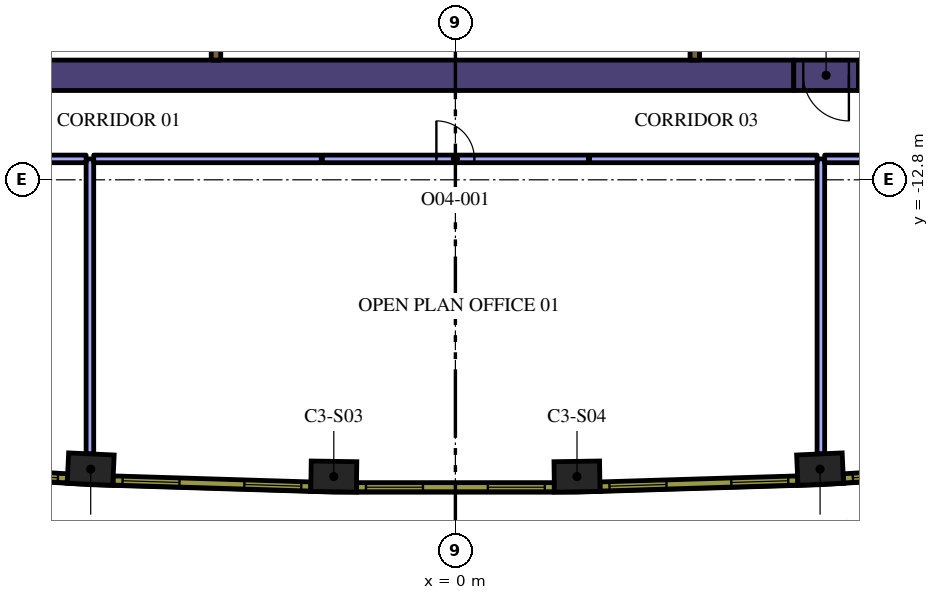
"""IFC4 building model, lengths in metres.
Left out: names, types, materials, properties, quantities, classifications, styles, units other than length and angle.
Written with IfcOpenShell. Run it as: python <this file> out.ifc"""

import sys

from ifc_helpers import new_model, si_unit, direction, frame, frame_2d, origin, origin_2d, place, context, subcontext, project, spatial, rectangle, extrude, element, fill, save


model = new_model("IFC4")
c1 = context("Model", 3, precision=1e-05, world=origin(), true_north=direction((0.0, 1.0)))
c2 = subcontext(c1, "Body", "Model", "MODEL_VIEW")
j1 = project(units=[si_unit("LENGTHUNIT", "METRE"), si_unit("PLANEANGLEUNIT", "RADIAN")], contexts=[c1])
p1 = place(None, origin())
s1 = spatial("IfcSite", under=j1, at=p1, CompositionType="ELEMENT")
p2 = place(p1, origin())
s2 = spatial("IfcBuilding", under=s1, at=p2, CompositionType="ELEMENT")
p3 = place(p2, frame((0.0, 0.0, 187.8)))
s3 = spatial("IfcBuildingStorey", under=s2, at=p3, CompositionType="ELEMENT", Elevation=187.8)
for number, where, z_axis, x_axis in (
    (1, (-9.597, -20.413, 0.0), (0.0, 0.0, 1.0), (0.999, -0.046, 0.0)),
    (2, (-3.2, -20.608, 0.0), (0.0, 0.0, 1.0), (1.0, -0.015, 0.0)),
    (3, (3.2, -20.608, 0.0), (0.0, 0.0, 1.0), (1.0, 0.015, 0.0)),
    (4, (9.597, -20.413, 0.0), (0.0, 0.0, 1.0), (0.999, 0.046, 0.0)),
):
    element("IfcColumn", number, at=place(p3, frame(where, z_axis=z_axis, x_axis=x_axis)), inside=s3, PredefinedType="COLUMN", context=c2, shape_type="SweptSolid", body=[
        extrude(rectangle(XDim=1.2, YDim=0.8, at=origin_2d()), origin(), (0.0, 0.0, 1.0), 4.2),
    ])
p4 = place(p3, frame((10.604, -10.05, 0.0), z_axis=(0.0, 0.0, 1.0), x_axis=(1.0, 0.0, 0.0)))
e5 = element("IfcWall", 5, at=p4, inside=s3, PredefinedType="SOLIDWALL", context=c2, shape_type="SweptSolid", body=[
    extrude(rectangle(XDim=1.849, YDim=0.8, at=frame_2d((0.925, 0.0))), origin(), (0.0, 0.0, 1.0), 4.2),
])
p5 = place(p3, frame((-13.378, -10.05, 0.0), z_axis=(0.0, 0.0, 1.0), x_axis=(1.0, 0.0, 0.0)))
e6 = element("IfcWall", 6, at=p5, inside=s3, PredefinedType="SOLIDWALL", context=c2, shape_type="SweptSolid", body=[
    extrude(rectangle(XDim=22.282, YDim=0.8, at=frame_2d((11.141, 0.0))), origin(), (0.0, 0.0, 1.0), 4.2),
])
p6 = place(p3, frame((-6.3, -8.925, 0.0), z_axis=(0.0, 0.0, 1.0), x_axis=(0.0, -1.0, 0.0)))
e7 = element("IfcWall", 7, at=p6, inside=s3, PredefinedType="SOLIDWALL", context=c2, shape_type="SweptSolid", body=[
    extrude(rectangle(XDim=0.725, YDim=0.25, at=frame_2d((0.363, 0.0))), origin(), (0.0, 0.0, 1.0), 4.2),
])
p7 = place(p3, frame((6.3, -9.65, 0.0), z_axis=(0.0, 0.0, 1.0), x_axis=(0.0, 1.0, 0.0)))
e8 = element("IfcWall", 8, at=p7, inside=s3, PredefinedType="SOLIDWALL", context=c2, shape_type="SweptSolid", body=[
    extrude(rectangle(XDim=1.008, YDim=0.25, at=frame_2d((0.504, 0.0))), origin(), (0.0, 0.0, 1.0), 4.2),
])
p8 = place(p3, frame((10.604, -10.05, 0.0), z_axis=(0.0, 0.0, 1.0), x_axis=(-1.0, 0.0, 0.0)))
e9 = element("IfcWall", 9, at=p8, inside=s3, PredefinedType="SOLIDWALL", context=c2, shape_type="SweptSolid", body=[
    extrude(rectangle(XDim=1.7, YDim=0.8, at=frame_2d((0.85, 0.0))), origin(), (0.0, 0.0, 1.0), 4.2),
])
p9 = place(p8, frame((0.25, 0.0, 0.0)))
e10 = element("IfcOpeningElement", 10, at=p9, cuts=e9, PredefinedType="OPENING", context=c2, shape_type="SweptSolid", body=[
    extrude(rectangle(XDim=1.2, YDim=2.1, at=frame_2d((0.6, 1.05))), frame((0.0, 0.41, 0.0), z_axis=(0.0, -1.0, 0.0), x_axis=(1.0, 0.0, 0.0)), (0.0, 0.0, 1.0), 0.82),
])
for number, where, z_axis, x_axis in (
    (11, (9.617, -12.25, 0.0), (0.0, 0.0, 1.0), (0.0, -1.0, 0.0)),
    (12, (-9.617, -20.011, 0.0), (0.0, 0.0, 1.0), (0.0, 1.0, 0.0)),
):
    element("IfcWall", number, at=place(p3, frame(where, z_axis=z_axis, x_axis=x_axis)), inside=s3, PredefinedType="PARTITIONING", context=c2, shape_type="SweptSolid", body=[
        extrude(rectangle(XDim=7.761, YDim=0.2, at=frame_2d((3.881, 0.0))), origin(), (0.0, 0.0, 1.0), 3.15),
    ])
p10 = place(p3, frame((-3.5, -12.25, 0.0), z_axis=(0.0, 0.0, 1.0), x_axis=(1.0, 0.0, 0.0)))
e13 = element("IfcWall", 13, at=p10, inside=s3, PredefinedType="PARTITIONING", context=c2, shape_type="SweptSolid", body=[
    extrude(rectangle(XDim=7.0, YDim=0.2, at=frame_2d((3.5, 0.0))), origin(), (0.0, 0.0, 1.0), 3.15),
])
p11 = place(p10, frame((3.0, 0.0, 0.0)))
e14 = element("IfcOpeningElement", 14, at=p11, cuts=e13, PredefinedType="OPENING", context=c2, shape_type="SweptSolid", body=[
    extrude(rectangle(XDim=1.0, YDim=2.1, at=frame_2d((0.5, 1.05))), frame((0.0, 0.11, 0.0), z_axis=(0.0, -1.0, 0.0), x_axis=(1.0, 0.0, 0.0)), (0.0, 0.0, 1.0), 0.22),
])
for number, where, z_axis, x_axis in (
    (15, (-9.517, -12.25, 0.0), (0.0, 0.0, 1.0), (1.0, 0.0, 0.0)),
    (16, (3.53, -12.25, 0.0), (0.0, 0.0, 1.0), (1.0, 0.0, 0.0)),
):
    element("IfcWall", number, at=place(p3, frame(where, z_axis=z_axis, x_axis=x_axis)), inside=s3, PredefinedType="PARTITIONING", context=c2, shape_type="SweptSolid", body=[
        extrude(rectangle(XDim=5.987, YDim=0.2, at=frame_2d((2.994, 0.0))), origin(), (0.0, 0.0, 1.0), 3.15),
    ])
p12 = place(p3, frame((9.717, -12.25, 0.0), z_axis=(0.0, 0.0, 1.0), x_axis=(1.0, 0.0, 0.0)))
e17 = element("IfcWall", 17, at=p12, inside=s3, PredefinedType="PARTITIONING", context=c2, shape_type="SweptSolid", body=[
    extrude(rectangle(XDim=4.688, YDim=0.2, at=frame_2d((2.344, 0.0))), origin(), (0.0, 0.0, 1.0), 3.15),
])
p13 = place(p12, frame((1.8, 0.0, 0.0)))
e18 = element("IfcOpeningElement", 18, at=p13, cuts=e17, PredefinedType="OPENING", context=c2, shape_type="SweptSolid", body=[
    extrude(rectangle(XDim=1.0, YDim=2.1, at=frame_2d((0.5, 1.05))), frame((0.0, 0.11, 0.0), z_axis=(0.0, -1.0, 0.0), x_axis=(1.0, 0.0, 0.0)), (0.0, 0.0, 1.0), 0.22),
])
p14 = place(p3, frame((-14.375, -12.25, 0.0), z_axis=(0.0, 0.0, 1.0), x_axis=(1.0, 0.0, 0.0)))
e19 = element("IfcWall", 19, at=p14, inside=s3, PredefinedType="PARTITIONING", context=c2, shape_type="SweptSolid", body=[
    extrude(rectangle(XDim=4.658, YDim=0.2, at=frame_2d((2.329, 0.0))), origin(), (0.0, 0.0, 1.0), 3.15),
])
p15 = place(p14, frame((1.8, 0.0, 0.0)))
e20 = element("IfcOpeningElement", 20, at=p15, cuts=e19, PredefinedType="OPENING", context=c2, shape_type="SweptSolid", body=[
    extrude(rectangle(XDim=1.0, YDim=2.1, at=frame_2d((0.5, 1.05))), frame((0.0, 0.11, 0.0), z_axis=(0.0, -1.0, 0.0), x_axis=(1.0, 0.0, 0.0)), (0.0, 0.0, 1.0), 0.22),
])
p16 = place(p3, frame((-15.405, -20.338, 0.0), z_axis=(0.0, 0.0, 1.0), x_axis=(0.998135294646, -0.061040425794, 0.0)))
e21 = element("IfcWall", 21, at=p16, inside=s3, PredefinedType="SOLIDWALL", context=c2, shape_type="SweptSolid", body=[
    extrude(rectangle(XDim=5.204, YDim=0.24, at=frame_2d((2.602, 0.0))), origin(), (0.0, 0.0, 1.0), 3.95),
])
p17 = place(p16, frame((0.248, 0.0, 0.9)))
e22 = element("IfcOpeningElement", 22, at=p17, cuts=e21, PredefinedType="OPENING", context=c2, shape_type="SweptSolid", body=[
    extrude(rectangle(XDim=1.5, YDim=2.55, at=frame_2d((0.75, 1.275))), frame((0.0, 0.13, 0.0), z_axis=(0.0, -1.0, 0.0), x_axis=(1.0, 0.0, 0.0)), (0.0, 0.0, 1.0), 0.26),
])
p18 = place(p16, frame((3.455, 0.0, 0.9)))
e23 = element("IfcOpeningElement", 23, at=p18, cuts=e21, PredefinedType="OPENING", context=c2, shape_type="SweptSolid", body=[
    extrude(rectangle(XDim=1.5, YDim=2.55, at=frame_2d((0.75, 1.275))), frame((0.0, 0.13, 0.0), z_axis=(0.0, -1.0, 0.0), x_axis=(1.0, 0.0, 0.0)), (0.0, 0.0, 1.0), 0.26),
])
p19 = place(p3, frame((-9.007, -20.711, 0.0), z_axis=(0.0, 0.0, 1.0), x_axis=(0.999533441983, -0.030543384845, 0.0)))
e24 = element("IfcWall", 24, at=p19, inside=s3, PredefinedType="SOLIDWALL", context=c2, shape_type="SweptSolid", body=[
    extrude(rectangle(XDim=5.204, YDim=0.24, at=frame_2d((2.602, 0.0))), origin(), (0.0, 0.0, 1.0), 3.95),
])
p20 = place(p19, frame((0.248, 0.0, 0.9)))
e25 = element("IfcOpeningElement", 25, at=p20, cuts=e24, PredefinedType="OPENING", context=c2, shape_type="SweptSolid", body=[
    extrude(rectangle(XDim=1.5, YDim=2.55, at=frame_2d((0.75, 1.275))), frame((0.0, 0.13, 0.0), z_axis=(0.0, -1.0, 0.0), x_axis=(1.0, 0.0, 0.0)), (0.0, 0.0, 1.0), 0.26),
])
p21 = place(p19, frame((3.455, 0.0, 0.9)))
e26 = element("IfcOpeningElement", 26, at=p21, cuts=e24, PredefinedType="OPENING", context=c2, shape_type="SweptSolid", body=[
    extrude(rectangle(XDim=1.5, YDim=2.55, at=frame_2d((0.75, 1.275))), frame((0.0, 0.13, 0.0), z_axis=(0.0, -1.0, 0.0), x_axis=(1.0, 0.0, 0.0)), (0.0, 0.0, 1.0), 0.26),
])
p22 = place(p3, frame((-2.602, -20.888, 0.0), z_axis=(0.0, 0.0, 1.0), x_axis=(1.0, 0.0, 0.0)))
e27 = element("IfcWall", 27, at=p22, inside=s3, PredefinedType="SOLIDWALL", context=c2, shape_type="SweptSolid", body=[
    extrude(rectangle(XDim=5.204, YDim=0.24, at=frame_2d((2.602, 0.0))), origin(), (0.0, 0.0, 1.0), 3.95),
])
p23 = place(p22, frame((0.248, 0.0, 0.9)))
e28 = element("IfcOpeningElement", 28, at=p23, cuts=e27, PredefinedType="OPENING", context=c2, shape_type="SweptSolid", body=[
    extrude(rectangle(XDim=1.5, YDim=2.55, at=frame_2d((0.75, 1.275))), frame((0.0, 0.13, 0.0), z_axis=(0.0, -1.0, 0.0), x_axis=(1.0, 0.0, 0.0)), (0.0, 0.0, 1.0), 0.26),
])
p24 = place(p22, frame((3.455, 0.0, 0.9)))
e29 = element("IfcOpeningElement", 29, at=p24, cuts=e27, PredefinedType="OPENING", context=c2, shape_type="SweptSolid", body=[
    extrude(rectangle(XDim=1.5, YDim=2.55, at=frame_2d((0.75, 1.275))), frame((0.0, 0.13, 0.0), z_axis=(0.0, -1.0, 0.0), x_axis=(1.0, 0.0, 0.0)), (0.0, 0.0, 1.0), 0.26),
])
p25 = place(p3, frame((3.806, -20.87, 0.0), z_axis=(0.0, 0.0, 1.0), x_axis=(0.999533441983, 0.030543384845, 0.0)))
e30 = element("IfcWall", 30, at=p25, inside=s3, PredefinedType="SOLIDWALL", context=c2, shape_type="SweptSolid", body=[
    extrude(rectangle(XDim=5.204, YDim=0.24, at=frame_2d((2.602, 0.0))), origin(), (0.0, 0.0, 1.0), 3.95),
])
p26 = place(p25, frame((0.248, 0.0, 0.9)))
e31 = element("IfcOpeningElement", 31, at=p26, cuts=e30, PredefinedType="OPENING", context=c2, shape_type="SweptSolid", body=[
    extrude(rectangle(XDim=1.5, YDim=2.55, at=frame_2d((0.75, 1.275))), frame((0.0, 0.13, 0.0), z_axis=(0.0, -1.0, 0.0), x_axis=(1.0, 0.0, 0.0)), (0.0, 0.0, 1.0), 0.26),
])
p27 = place(p25, frame((3.455, 0.0, 0.9)))
e32 = element("IfcOpeningElement", 32, at=p27, cuts=e30, PredefinedType="OPENING", context=c2, shape_type="SweptSolid", body=[
    extrude(rectangle(XDim=1.5, YDim=2.55, at=frame_2d((0.75, 1.275))), frame((0.0, 0.13, 0.0), z_axis=(0.0, -1.0, 0.0), x_axis=(1.0, 0.0, 0.0)), (0.0, 0.0, 1.0), 0.26),
])
p28 = place(p3, frame((10.211, -20.656, 0.0), z_axis=(0.0, 0.0, 1.0), x_axis=(0.998135294646, 0.061040425794, 0.0)))
e33 = element("IfcWall", 33, at=p28, inside=s3, PredefinedType="SOLIDWALL", context=c2, shape_type="SweptSolid", body=[
    extrude(rectangle(XDim=5.204, YDim=0.24, at=frame_2d((2.602, 0.0))), origin(), (0.0, 0.0, 1.0), 3.95),
])
p29 = place(p28, frame((0.248, 0.0, 0.9)))
e34 = element("IfcOpeningElement", 34, at=p29, cuts=e33, PredefinedType="OPENING", context=c2, shape_type="SweptSolid", body=[
    extrude(rectangle(XDim=1.5, YDim=2.55, at=frame_2d((0.75, 1.275))), frame((0.0, 0.13, 0.0), z_axis=(0.0, -1.0, 0.0), x_axis=(1.0, 0.0, 0.0)), (0.0, 0.0, 1.0), 0.26),
])
p30 = place(p28, frame((3.455, 0.0, 0.9)))
e35 = element("IfcOpeningElement", 35, at=p30, cuts=e33, PredefinedType="OPENING", context=c2, shape_type="SweptSolid", body=[
    extrude(rectangle(XDim=1.5, YDim=2.55, at=frame_2d((0.75, 1.275))), frame((0.0, 0.13, 0.0), z_axis=(0.0, -1.0, 0.0), x_axis=(1.0, 0.0, 0.0)), (0.0, 0.0, 1.0), 0.26),
])
p31 = place(p9, origin())
e36 = element("IfcDoor", 36, at=p31, inside=s3, OperationType="SINGLE_SWING_LEFT", PredefinedType="DOOR", context=c2, shape_type="SweptSolid", body=[
    extrude(rectangle(XDim=1.2, YDim=2.1, at=frame_2d((0.6, 1.05))), frame((0.0, 0.025, 0.0), z_axis=(0.0, -1.0, 0.0), x_axis=(1.0, 0.0, 0.0)), (0.0, 0.0, 1.0), 0.05),
])
fill(e10, e36)
p32 = place(p11, origin())
e37 = element("IfcDoor", 37, at=p32, inside=s3, OperationType="SINGLE_SWING_RIGHT", PredefinedType="DOOR", context=c2, shape_type="SweptSolid", body=[
    extrude(rectangle(XDim=1.0, YDim=2.1, at=frame_2d((0.5, 1.05))), frame((0.0, 0.025, 0.0), z_axis=(0.0, -1.0, 0.0), x_axis=(1.0, 0.0, 0.0)), (0.0, 0.0, 1.0), 0.05),
])
fill(e14, e37)
p33 = place(p18, origin())
e38 = element("IfcWindow", 38, at=p33, inside=s3, PartitioningType="SINGLE_PANEL", PredefinedType="WINDOW", context=c2, shape_type="SweptSolid", body=[
    extrude(rectangle(XDim=1.5, YDim=2.55, at=frame_2d((0.75, 1.275))), frame((0.0, 0.04, 0.0), z_axis=(0.0, -1.0, 0.0), x_axis=(1.0, 0.0, 0.0)), (0.0, 0.0, 1.0), 0.06),
])
fill(e23, e38)
p34 = place(p20, origin())
e39 = element("IfcWindow", 39, at=p34, inside=s3, PartitioningType="SINGLE_PANEL", PredefinedType="WINDOW", context=c2, shape_type="SweptSolid", body=[
    extrude(rectangle(XDim=1.5, YDim=2.55, at=frame_2d((0.75, 1.275))), frame((0.0, 0.04, 0.0), z_axis=(0.0, -1.0, 0.0), x_axis=(1.0, 0.0, 0.0)), (0.0, 0.0, 1.0), 0.06),
])
fill(e25, e39)
p35 = place(p21, origin())
e40 = element("IfcWindow", 40, at=p35, inside=s3, PartitioningType="SINGLE_PANEL", PredefinedType="WINDOW", context=c2, shape_type="SweptSolid", body=[
    extrude(rectangle(XDim=1.5, YDim=2.55, at=frame_2d((0.75, 1.275))), frame((0.0, 0.04, 0.0), z_axis=(0.0, -1.0, 0.0), x_axis=(1.0, 0.0, 0.0)), (0.0, 0.0, 1.0), 0.06),
])
fill(e26, e40)
p36 = place(p23, origin())
e41 = element("IfcWindow", 41, at=p36, inside=s3, PartitioningType="SINGLE_PANEL", PredefinedType="WINDOW", context=c2, shape_type="SweptSolid", body=[
    extrude(rectangle(XDim=1.5, YDim=2.55, at=frame_2d((0.75, 1.275))), frame((0.0, 0.04, 0.0), z_axis=(0.0, -1.0, 0.0), x_axis=(1.0, 0.0, 0.0)), (0.0, 0.0, 1.0), 0.06),
])
fill(e28, e41)
p37 = place(p24, origin())
e42 = element("IfcWindow", 42, at=p37, inside=s3, PartitioningType="SINGLE_PANEL", PredefinedType="WINDOW", context=c2, shape_type="SweptSolid", body=[
    extrude(rectangle(XDim=1.5, YDim=2.55, at=frame_2d((0.75, 1.275))), frame((0.0, 0.04, 0.0), z_axis=(0.0, -1.0, 0.0), x_axis=(1.0, 0.0, 0.0)), (0.0, 0.0, 1.0), 0.06),
])
fill(e29, e42)
p38 = place(p26, origin())
e43 = element("IfcWindow", 43, at=p38, inside=s3, PartitioningType="SINGLE_PANEL", PredefinedType="WINDOW", context=c2, shape_type="SweptSolid", body=[
    extrude(rectangle(XDim=1.5, YDim=2.55, at=frame_2d((0.75, 1.275))), frame((0.0, 0.04, 0.0), z_axis=(0.0, -1.0, 0.0), x_axis=(1.0, 0.0, 0.0)), (0.0, 0.0, 1.0), 0.06),
])
fill(e31, e43)
p39 = place(p27, origin())
e44 = element("IfcWindow", 44, at=p39, inside=s3, PartitioningType="SINGLE_PANEL", PredefinedType="WINDOW", context=c2, shape_type="SweptSolid", body=[
    extrude(rectangle(XDim=1.5, YDim=2.55, at=frame_2d((0.75, 1.275))), frame((0.0, 0.04, 0.0), z_axis=(0.0, -1.0, 0.0), x_axis=(1.0, 0.0, 0.0)), (0.0, 0.0, 1.0), 0.06),
])
fill(e32, e44)
p40 = place(p29, origin())
e45 = element("IfcWindow", 45, at=p40, inside=s3, PartitioningType="SINGLE_PANEL", PredefinedType="WINDOW", context=c2, shape_type="SweptSolid", body=[
    extrude(rectangle(XDim=1.5, YDim=2.55, at=frame_2d((0.75, 1.275))), frame((0.0, 0.04, 0.0), z_axis=(0.0, -1.0, 0.0), x_axis=(1.0, 0.0, 0.0)), (0.0, 0.0, 1.0), 0.06),
])
fill(e34, e45)
save(model, sys.argv[1])
